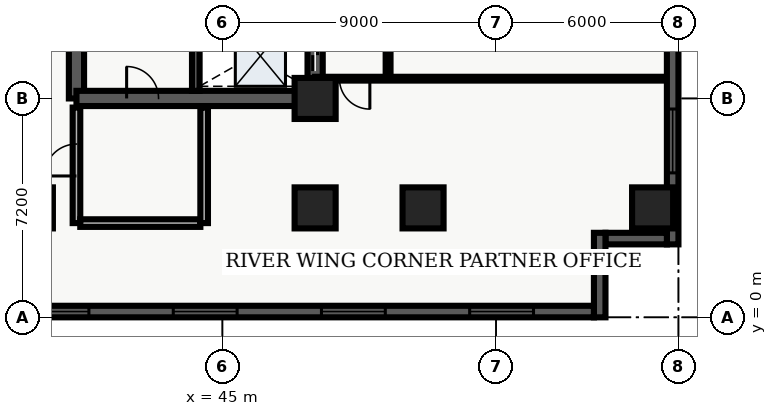
"""IFC4 building model, lengths in metres.
Left out: names, types, materials, properties, quantities, classifications, styles, units other than length and angle.
Written with IfcOpenShell. Run it as: python <this file> out.ifc"""

import sys

from ifc_helpers import new_model, entity, si_unit, converted_unit, direction, frame, origin_with_axes, origin_2d_with_axis, place, context, subcontext, project, spatial, polyline, rectangle, outline, extrude, element, fill, save


model = new_model("IFC4")
c1 = context("Model", 3, precision=1e-05, world=origin_with_axes(), true_north=direction((0.0, 1.0)))
c2 = subcontext(c1, "Body", "Model", "MODEL_VIEW")
j1 = project(units=[si_unit("LENGTHUNIT", "METRE"), converted_unit("PLANEANGLEUNIT", "DEGREE", entity("IfcPlaneAngleMeasure", 0.017), si_unit("PLANEANGLEUNIT", "RADIAN"), dimensions=[0, 0, 0, 0, 0, 0, 0])], contexts=[c1])
p1 = place(None, origin_with_axes())
s1 = spatial("IfcSite", under=j1, at=p1, CompositionType="ELEMENT")
p2 = place(p1, origin_with_axes())
s2 = spatial("IfcBuilding", under=s1, at=p2, CompositionType="ELEMENT")
p3 = place(p2, frame((0.0, 0.0, 84.6), z_axis=(0.0, 0.0, 1.0), x_axis=(1.0, 0.0, 0.0)))
s3 = spatial("IfcBuildingStorey", under=s2, at=p3, CompositionType="ELEMENT", Elevation=84.6)
p4 = place(p3, frame((40.2, 7.2, 0.0), z_axis=(0.0, 0.0, 1.0), x_axis=(0.0, 1.0, 0.0)))
e1 = element("IfcWall", 1, at=p4, inside=s3, PredefinedType="SHEAR", context=c2, shape_type="SweptSolid", body=[
    extrude(outline(polyline([(0.0, -0.25), (15.6, -0.25), (15.6, 0.25), (0.0, 0.25), (0.0, -0.25)])), origin_with_axes(), (0.0, 0.0, 1.0), 4.26),
])
p5 = place(p4, frame((12.75, 0.0, 0.0), z_axis=(0.0, 0.0, 1.0), x_axis=(1.0, 0.0, 0.0)))
e2 = element("IfcOpeningElement", 2, at=p5, cuts=e1, PredefinedType="OPENING", context=c2, shape_type="SweptSolid", body=[
    extrude(rectangle(XDim=1.2, YDim=0.52, at=origin_2d_with_axis()), origin_with_axes(), (0.0, 0.0, 1.0), 2.15),
])
p6 = place(p4, frame((9.3, 0.0, 0.0), z_axis=(0.0, 0.0, 1.0), x_axis=(1.0, 0.0, 0.0)))
e3 = element("IfcOpeningElement", 3, at=p6, cuts=e1, PredefinedType="OPENING", context=c2, shape_type="SweptSolid", body=[
    extrude(rectangle(XDim=0.9, YDim=0.52, at=origin_2d_with_axis()), origin_with_axes(), (0.0, 0.0, 1.0), 2.15),
])
p7 = place(p3, frame((40.2, 7.2, 0.0), z_axis=(0.0, 0.0, 1.0), x_axis=(1.0, 0.0, 0.0)))
e4 = element("IfcWall", 4, at=p7, inside=s3, PredefinedType="SHEAR", context=c2, shape_type="SweptSolid", body=[
    extrude(outline(polyline([(0.0, -0.25), (7.85, -0.25), (7.85, 0.25), (0.0, 0.25), (0.0, -0.25)])), origin_with_axes(), (0.0, 0.0, 1.0), 4.26),
])
p8 = place(p7, frame((2.175, 0.0, 0.0), z_axis=(0.0, 0.0, 1.0), x_axis=(1.0, 0.0, 0.0)))
e5 = element("IfcOpeningElement", 5, at=p8, cuts=e4, PredefinedType="OPENING", context=c2, shape_type="SweptSolid", body=[
    extrude(rectangle(XDim=1.05, YDim=0.52, at=origin_2d_with_axis()), origin_with_axes(), (0.0, 0.0, 1.0), 2.15),
])
p9 = place(p3, frame((48.05, 7.2, 0.0), z_axis=(0.0, 0.0, 1.0), x_axis=(0.0, 1.0, 0.0)))
e6 = element("IfcWall", 6, at=p9, inside=s3, PredefinedType="SHEAR", context=c2, shape_type="SweptSolid", body=[
    extrude(outline(polyline([(0.0, -0.25), (15.6, -0.25), (15.6, 0.25), (0.0, 0.25), (0.0, -0.25)])), origin_with_axes(), (0.0, 0.0, 1.0), 4.26),
])
p10 = place(p9, frame((1.425, 0.0, 0.0), z_axis=(0.0, 0.0, 1.0), x_axis=(1.0, 0.0, 0.0)))
e7 = element("IfcOpeningElement", 7, at=p10, cuts=e6, PredefinedType="OPENING", context=c2, shape_type="SweptSolid", body=[
    extrude(rectangle(XDim=1.05, YDim=0.52, at=origin_2d_with_axis()), origin_with_axes(), (0.0, 0.0, 1.0), 2.15),
])
p11 = place(p9, frame((3.475, 0.0, 0.0), z_axis=(0.0, 0.0, 1.0), x_axis=(1.0, 0.0, 0.0)))
e8 = element("IfcOpeningElement", 8, at=p11, cuts=e6, PredefinedType="OPENING", context=c2, shape_type="SweptSolid", body=[
    extrude(rectangle(XDim=1.05, YDim=0.52, at=origin_2d_with_axis()), origin_with_axes(), (0.0, 0.0, 1.0), 2.15),
])
p12 = place(p9, frame((5.625, 0.0, 0.0), z_axis=(0.0, 0.0, 1.0), x_axis=(1.0, 0.0, 0.0)))
e9 = element("IfcOpeningElement", 9, at=p12, cuts=e6, PredefinedType="OPENING", context=c2, shape_type="SweptSolid", body=[
    extrude(rectangle(XDim=0.95, YDim=0.52, at=origin_2d_with_axis()), origin_with_axes(), (0.0, 0.0, 1.0), 2.15),
])
p13 = place(p3, frame((44.125, 7.45, 0.0), z_axis=(0.0, 0.0, 1.0), x_axis=(0.0, 1.0, 0.0)))
e10 = element("IfcWall", 10, at=p13, inside=s3, PredefinedType="SHEAR", context=c2, shape_type="SweptSolid", body=[
    extrude(outline(polyline([(0.0, -0.125), (15.1, -0.125), (15.1, 0.125), (0.0, 0.125), (0.0, -0.125)])), origin_with_axes(), (0.0, 0.0, 1.0), 4.26),
])
p14 = place(p3, frame((40.2, 3.1, 0.0), z_axis=(0.0, 0.0, 1.0), x_axis=(0.0, 1.0, 0.0)))
e11 = element("IfcWall", 11, at=p14, inside=s3, PredefinedType="SOLIDWALL", context=c2, shape_type="SweptSolid", body=[
    extrude(outline(polyline([(0.0, -0.125), (3.8, -0.125), (3.8, 0.125), (0.0, 0.125), (0.0, -0.125)])), origin_with_axes(), (0.0, 0.0, 1.0), 3.3),
])
p15 = place(p14, frame((2.075, 0.0, 0.0), z_axis=(0.0, 0.0, 1.0), x_axis=(1.0, 0.0, 0.0)))
e12 = element("IfcOpeningElement", 12, at=p15, cuts=e11, PredefinedType="OPENING", context=c2, shape_type="SweptSolid", body=[
    extrude(rectangle(XDim=1.05, YDim=0.27, at=origin_2d_with_axis()), origin_with_axes(), (0.0, 0.0, 1.0), 2.15),
])
p16 = place(p3, frame((40.325, 3.1, 0.0), z_axis=(0.0, 0.0, 1.0), x_axis=(1.0, 0.0, 0.0)))
e13 = element("IfcWall", 13, at=p16, inside=s3, PredefinedType="SOLIDWALL", context=c2, shape_type="SweptSolid", body=[
    extrude(outline(polyline([(0.0, -0.125), (3.95, -0.125), (3.95, 0.125), (0.0, 0.125), (0.0, -0.125)])), origin_with_axes(), (0.0, 0.0, 1.0), 3.3),
])
p17 = place(p3, frame((44.4, 3.1, 0.0), z_axis=(0.0, 0.0, 1.0), x_axis=(0.0, 1.0, 0.0)))
e14 = element("IfcWall", 14, at=p17, inside=s3, PredefinedType="SOLIDWALL", context=c2, shape_type="SweptSolid", body=[
    extrude(outline(polyline([(0.0, -0.125), (3.8, -0.125), (3.8, 0.125), (0.0, 0.125), (0.0, -0.125)])), origin_with_axes(), (0.0, 0.0, 1.0), 3.3),
])
for number, where, z_axis, x_axis in (
    (15, (38.75, 3.6, 0.0), (0.0, 0.0, 1.0), (1.0, 0.0, 0.0)),
    (16, (48.05, 3.6, 0.0), (0.0, 0.0, 1.0), (1.0, 0.0, 0.0)),
    (17, (48.05, 7.2, 0.0), (0.0, 0.0, 1.0), (1.0, 0.0, 0.0)),
    (18, (51.6, 3.6, 0.0), (0.0, 0.0, 1.0), (1.0, 0.0, 0.0)),
    (19, (59.15, 3.6, 0.0), (0.0, 0.0, 1.0), (1.0, 0.0, 0.0)),
):
    element("IfcColumn", number, at=place(p3, frame(where, z_axis=z_axis, x_axis=x_axis)), inside=s3, PredefinedType="COLUMN", context=c2, shape_type="SweptSolid", body=[
        extrude(rectangle(XDim=1.35, YDim=1.35, at=origin_2d_with_axis()), origin_with_axes(), (0.0, 0.0, 1.0), 4.5),
    ])
p18 = place(p3, frame((50.45, 7.85, 0.0), z_axis=(0.0, 0.0, 1.0), x_axis=(0.0, 1.0, 0.0)))
e20 = element("IfcWall", 20, at=p18, inside=s3, PredefinedType="PARTITIONING", context=c2, shape_type="SweptSolid", body=[
    extrude(outline(polyline([(0.0, -0.08), (18.8, -0.08), (18.8, 0.08), (0.0, 0.08), (0.0, -0.08)])), origin_with_axes(), (0.0, 0.0, 1.0), 3.2),
])
p19 = place(p18, frame((4.293, 0.0, 0.0), z_axis=(0.0, 0.0, 1.0), x_axis=(1.0, 0.0, 0.0)))
e21 = element("IfcOpeningElement", 21, at=p19, cuts=e20, PredefinedType="OPENING", context=c2, shape_type="SweptSolid", body=[
    extrude(rectangle(XDim=1.0, YDim=0.18, at=origin_2d_with_axis()), origin_with_axes(), (0.0, 0.0, 1.0), 2.15),
])
p20 = place(p18, frame((13.633, 0.0, 0.0), z_axis=(0.0, 0.0, 1.0), x_axis=(1.0, 0.0, 0.0)))
e22 = element("IfcOpeningElement", 22, at=p20, cuts=e20, PredefinedType="OPENING", context=c2, shape_type="SweptSolid", body=[
    extrude(rectangle(XDim=1.0, YDim=0.18, at=origin_2d_with_axis()), origin_with_axes(), (0.0, 0.0, 1.0), 2.15),
])
p21 = place(p3, frame((59.64, 7.85, 0.0), z_axis=(0.0, 0.0, 1.0), x_axis=(-1.0, 0.0, 0.0)))
e23 = element("IfcWall", 23, at=p21, inside=s3, PredefinedType="PARTITIONING", context=c2, shape_type="SweptSolid", body=[
    extrude(outline(polyline([(0.0, -0.062), (11.59, -0.062), (11.59, 0.062), (0.0, 0.062), (0.0, -0.062)])), origin_with_axes(), (0.0, 0.0, 1.0), 3.2),
])
p22 = place(p21, frame((10.29, 0.0, 0.0), z_axis=(0.0, 0.0, 1.0), x_axis=(1.0, 0.0, 0.0)))
e24 = element("IfcOpeningElement", 24, at=p22, cuts=e23, PredefinedType="OPENING", context=c2, shape_type="SweptSolid", body=[
    extrude(rectangle(XDim=1.0, YDim=0.145, at=origin_2d_with_axis()), origin_with_axes(), (0.0, 0.0, 1.0), 2.15),
])
p23 = place(p3, frame((59.81, 26.02, 0.0), z_axis=(0.0, 0.0, 1.0), x_axis=(0.0, -1.0, 0.0)))
e25 = element("IfcWall", 25, at=p23, inside=s3, PredefinedType="SOLIDWALL", context=c2, shape_type="SweptSolid", body=[
    extrude(outline(polyline([(0.0, -0.19), (23.62, -0.19), (23.62, 0.19), (0.0, 0.19), (0.0, -0.19)])), origin_with_axes(), (0.0, 0.0, 1.0), 4.26),
])
p24 = place(p23, frame((3.853, 0.0, 0.45), z_axis=(0.0, 0.0, 1.0), x_axis=(1.0, 0.0, 0.0)))
e26 = element("IfcOpeningElement", 26, at=p24, cuts=e25, PredefinedType="OPENING", context=c2, shape_type="SweptSolid", body=[
    extrude(rectangle(XDim=2.1, YDim=0.4, at=origin_2d_with_axis()), origin_with_axes(), (0.0, 0.0, 1.0), 2.2),
])
p25 = place(p23, frame((20.218, 0.0, 0.45), z_axis=(0.0, 0.0, 1.0), x_axis=(1.0, 0.0, 0.0)))
e27 = element("IfcOpeningElement", 27, at=p25, cuts=e25, PredefinedType="OPENING", context=c2, shape_type="SweptSolid", body=[
    extrude(rectangle(XDim=2.1, YDim=0.4, at=origin_2d_with_axis()), origin_with_axes(), (0.0, 0.0, 1.0), 2.2),
])
p26 = place(p3, frame((59.62, 2.59, 0.0), z_axis=(0.0, 0.0, 1.0), x_axis=(-1.0, 0.0, 0.0)))
e28 = element("IfcWall", 28, at=p26, inside=s3, PredefinedType="SOLIDWALL", context=c2, shape_type="SweptSolid", body=[
    extrude(outline(polyline([(0.0, -0.19), (2.02, -0.19), (2.02, 0.19), (0.0, 0.19), (0.0, -0.19)])), origin_with_axes(), (0.0, 0.0, 1.0), 4.26),
])
p27 = place(p3, frame((57.41, 2.78, 0.0), z_axis=(0.0, 0.0, 1.0), x_axis=(0.0, -1.0, 0.0)))
e29 = element("IfcWall", 29, at=p27, inside=s3, PredefinedType="SOLIDWALL", context=c2, shape_type="SweptSolid", body=[
    extrude(outline(polyline([(0.0, -0.19), (2.78, -0.19), (2.78, 0.19), (0.0, 0.19), (0.0, -0.19)])), origin_with_axes(), (0.0, 0.0, 1.0), 4.26),
])
p28 = place(p3, frame((57.22, 0.19, 0.0), z_axis=(0.0, 0.0, 1.0), x_axis=(-1.0, 0.0, 0.0)))
e30 = element("IfcWall", 30, at=p28, inside=s3, PredefinedType="SOLIDWALL", context=c2, shape_type="SweptSolid", body=[
    extrude(outline(polyline([(0.0, -0.19), (54.82, -0.19), (54.82, 0.19), (0.0, 0.19), (0.0, -0.19)])), origin_with_axes(), (0.0, 0.0, 1.0), 4.26),
])
p29 = place(p28, frame((3.037, 0.0, 0.45), z_axis=(0.0, 0.0, 1.0), x_axis=(1.0, 0.0, 0.0)))
e31 = element("IfcOpeningElement", 31, at=p29, cuts=e30, PredefinedType="OPENING", context=c2, shape_type="SweptSolid", body=[
    extrude(rectangle(XDim=2.1, YDim=0.4, at=origin_2d_with_axis()), origin_with_axes(), (0.0, 0.0, 1.0), 2.2),
])
p30 = place(p28, frame((7.912, 0.0, 0.45), z_axis=(0.0, 0.0, 1.0), x_axis=(1.0, 0.0, 0.0)))
e32 = element("IfcOpeningElement", 32, at=p30, cuts=e30, PredefinedType="OPENING", context=c2, shape_type="SweptSolid", body=[
    extrude(rectangle(XDim=2.1, YDim=0.4, at=origin_2d_with_axis()), origin_with_axes(), (0.0, 0.0, 1.0), 2.2),
])
p31 = place(p28, frame((12.786, 0.0, 0.45), z_axis=(0.0, 0.0, 1.0), x_axis=(1.0, 0.0, 0.0)))
e33 = element("IfcOpeningElement", 33, at=p31, cuts=e30, PredefinedType="OPENING", context=c2, shape_type="SweptSolid", body=[
    extrude(rectangle(XDim=2.1, YDim=0.4, at=origin_2d_with_axis()), origin_with_axes(), (0.0, 0.0, 1.0), 2.2),
])
p32 = place(p28, frame((17.661, 0.0, 0.45), z_axis=(0.0, 0.0, 1.0), x_axis=(1.0, 0.0, 0.0)))
e34 = element("IfcOpeningElement", 34, at=p32, cuts=e30, PredefinedType="OPENING", context=c2, shape_type="SweptSolid", body=[
    extrude(rectangle(XDim=2.1, YDim=0.4, at=origin_2d_with_axis()), origin_with_axes(), (0.0, 0.0, 1.0), 2.2),
])
p33 = place(p28, frame((22.535, 0.0, 0.45), z_axis=(0.0, 0.0, 1.0), x_axis=(1.0, 0.0, 0.0)))
e35 = element("IfcOpeningElement", 35, at=p33, cuts=e30, PredefinedType="OPENING", context=c2, shape_type="SweptSolid", body=[
    extrude(rectangle(XDim=2.1, YDim=0.4, at=origin_2d_with_axis()), origin_with_axes(), (0.0, 0.0, 1.0), 2.2),
])
p34 = place(p28, frame((27.41, 0.0, 0.45), z_axis=(0.0, 0.0, 1.0), x_axis=(1.0, 0.0, 0.0)))
e36 = element("IfcOpeningElement", 36, at=p34, cuts=e30, PredefinedType="OPENING", context=c2, shape_type="SweptSolid", body=[
    extrude(rectangle(XDim=2.1, YDim=0.4, at=origin_2d_with_axis()), origin_with_axes(), (0.0, 0.0, 1.0), 2.2),
])
p35 = place(p28, frame((32.285, 0.0, 0.45), z_axis=(0.0, 0.0, 1.0), x_axis=(1.0, 0.0, 0.0)))
e37 = element("IfcOpeningElement", 37, at=p35, cuts=e30, PredefinedType="OPENING", context=c2, shape_type="SweptSolid", body=[
    extrude(rectangle(XDim=2.1, YDim=0.4, at=origin_2d_with_axis()), origin_with_axes(), (0.0, 0.0, 1.0), 2.2),
])
p36 = place(p28, frame((37.159, 0.0, 0.45), z_axis=(0.0, 0.0, 1.0), x_axis=(1.0, 0.0, 0.0)))
e38 = element("IfcOpeningElement", 38, at=p36, cuts=e30, PredefinedType="OPENING", context=c2, shape_type="SweptSolid", body=[
    extrude(rectangle(XDim=2.1, YDim=0.4, at=origin_2d_with_axis()), origin_with_axes(), (0.0, 0.0, 1.0), 2.2),
])
p37 = place(p28, frame((42.034, 0.0, 0.45), z_axis=(0.0, 0.0, 1.0), x_axis=(1.0, 0.0, 0.0)))
e39 = element("IfcOpeningElement", 39, at=p37, cuts=e30, PredefinedType="OPENING", context=c2, shape_type="SweptSolid", body=[
    extrude(rectangle(XDim=2.1, YDim=0.4, at=origin_2d_with_axis()), origin_with_axes(), (0.0, 0.0, 1.0), 2.2),
])
p38 = place(p28, frame((46.908, 0.0, 0.45), z_axis=(0.0, 0.0, 1.0), x_axis=(1.0, 0.0, 0.0)))
e40 = element("IfcOpeningElement", 40, at=p38, cuts=e30, PredefinedType="OPENING", context=c2, shape_type="SweptSolid", body=[
    extrude(rectangle(XDim=2.1, YDim=0.4, at=origin_2d_with_axis()), origin_with_axes(), (0.0, 0.0, 1.0), 2.2),
])
p39 = place(p28, frame((51.783, 0.0, 0.45), z_axis=(0.0, 0.0, 1.0), x_axis=(1.0, 0.0, 0.0)))
e41 = element("IfcOpeningElement", 41, at=p39, cuts=e30, PredefinedType="OPENING", context=c2, shape_type="SweptSolid", body=[
    extrude(rectangle(XDim=2.1, YDim=0.4, at=origin_2d_with_axis()), origin_with_axes(), (0.0, 0.0, 1.0), 2.2),
])
p40 = place(p9, frame((1.425, 0.0, 0.0), z_axis=(0.0, 0.0, 1.0), x_axis=(1.0, 0.0, 0.0)))
e42 = element("IfcDoor", 42, at=p40, inside=s3, OperationType="SLIDING_TO_LEFT", PredefinedType="DOOR", context=c2, shape_type="SweptSolid", body=[
    extrude(rectangle(XDim=1.05, YDim=0.09, at=origin_2d_with_axis()), origin_with_axes(), (0.0, 0.0, 1.0), 2.15),
])
fill(e7, e42)
p41 = place(p7, frame((2.175, 0.0, 0.0), z_axis=(0.0, 0.0, 1.0), x_axis=(1.0, 0.0, 0.0)))
e43 = element("IfcDoor", 43, at=p41, inside=s3, OperationType="SINGLE_SWING_LEFT", PredefinedType="DOOR", context=c2, shape_type="SweptSolid", body=[
    extrude(rectangle(XDim=1.05, YDim=0.09, at=origin_2d_with_axis()), origin_with_axes(), (0.0, 0.0, 1.0), 2.15),
])
fill(e5, e43)
p42 = place(p14, frame((2.075, 0.0, 0.0), z_axis=(0.0, 0.0, 1.0), x_axis=(1.0, 0.0, 0.0)))
e44 = element("IfcDoor", 44, at=p42, inside=s3, OperationType="SINGLE_SWING_LEFT", PredefinedType="DOOR", context=c2, shape_type="SweptSolid", body=[
    extrude(rectangle(XDim=1.05, YDim=0.09, at=origin_2d_with_axis()), origin_with_axes(), (0.0, 0.0, 1.0), 2.15),
])
fill(e12, e44)
p43 = place(p21, frame((10.29, 0.0, 0.0), z_axis=(0.0, 0.0, 1.0), x_axis=(1.0, 0.0, 0.0)))
e45 = element("IfcDoor", 45, at=p43, inside=s3, OperationType="SINGLE_SWING_LEFT", PredefinedType="DOOR", context=c2, shape_type="SweptSolid", body=[
    extrude(rectangle(XDim=1.0, YDim=0.075, at=origin_2d_with_axis()), origin_with_axes(), (0.0, 0.0, 1.0), 2.15),
])
fill(e24, e45)
p44 = place(p23, frame((20.218, 0.0, 0.45), z_axis=(0.0, 0.0, 1.0), x_axis=(1.0, 0.0, 0.0)))
e46 = element("IfcWindow", 46, at=p44, inside=s3, PredefinedType="WINDOW", context=c2, shape_type="SweptSolid", body=[
    extrude(rectangle(XDim=2.1, YDim=0.09, at=origin_2d_with_axis()), origin_with_axes(), (0.0, 0.0, 1.0), 2.2),
])
fill(e27, e46)
p45 = place(p28, frame((3.037, 0.0, 0.45), z_axis=(0.0, 0.0, 1.0), x_axis=(1.0, 0.0, 0.0)))
e47 = element("IfcWindow", 47, at=p45, inside=s3, PredefinedType="WINDOW", context=c2, shape_type="SweptSolid", body=[
    extrude(rectangle(XDim=2.1, YDim=0.09, at=origin_2d_with_axis()), origin_with_axes(), (0.0, 0.0, 1.0), 2.2),
])
fill(e31, e47)
p46 = place(p28, frame((7.912, 0.0, 0.45), z_axis=(0.0, 0.0, 1.0), x_axis=(1.0, 0.0, 0.0)))
e48 = element("IfcWindow", 48, at=p46, inside=s3, PredefinedType="WINDOW", context=c2, shape_type="SweptSolid", body=[
    extrude(rectangle(XDim=2.1, YDim=0.09, at=origin_2d_with_axis()), origin_with_axes(), (0.0, 0.0, 1.0), 2.2),
])
fill(e32, e48)
p47 = place(p28, frame((12.786, 0.0, 0.45), z_axis=(0.0, 0.0, 1.0), x_axis=(1.0, 0.0, 0.0)))
e49 = element("IfcWindow", 49, at=p47, inside=s3, PredefinedType="WINDOW", context=c2, shape_type="SweptSolid", body=[
    extrude(rectangle(XDim=2.1, YDim=0.09, at=origin_2d_with_axis()), origin_with_axes(), (0.0, 0.0, 1.0), 2.2),
])
fill(e33, e49)
p48 = place(p28, frame((17.661, 0.0, 0.45), z_axis=(0.0, 0.0, 1.0), x_axis=(1.0, 0.0, 0.0)))
e50 = element("IfcWindow", 50, at=p48, inside=s3, PredefinedType="WINDOW", context=c2, shape_type="SweptSolid", body=[
    extrude(rectangle(XDim=2.1, YDim=0.09, at=origin_2d_with_axis()), origin_with_axes(), (0.0, 0.0, 1.0), 2.2),
])
fill(e34, e50)
save(model, sys.argv[1])
